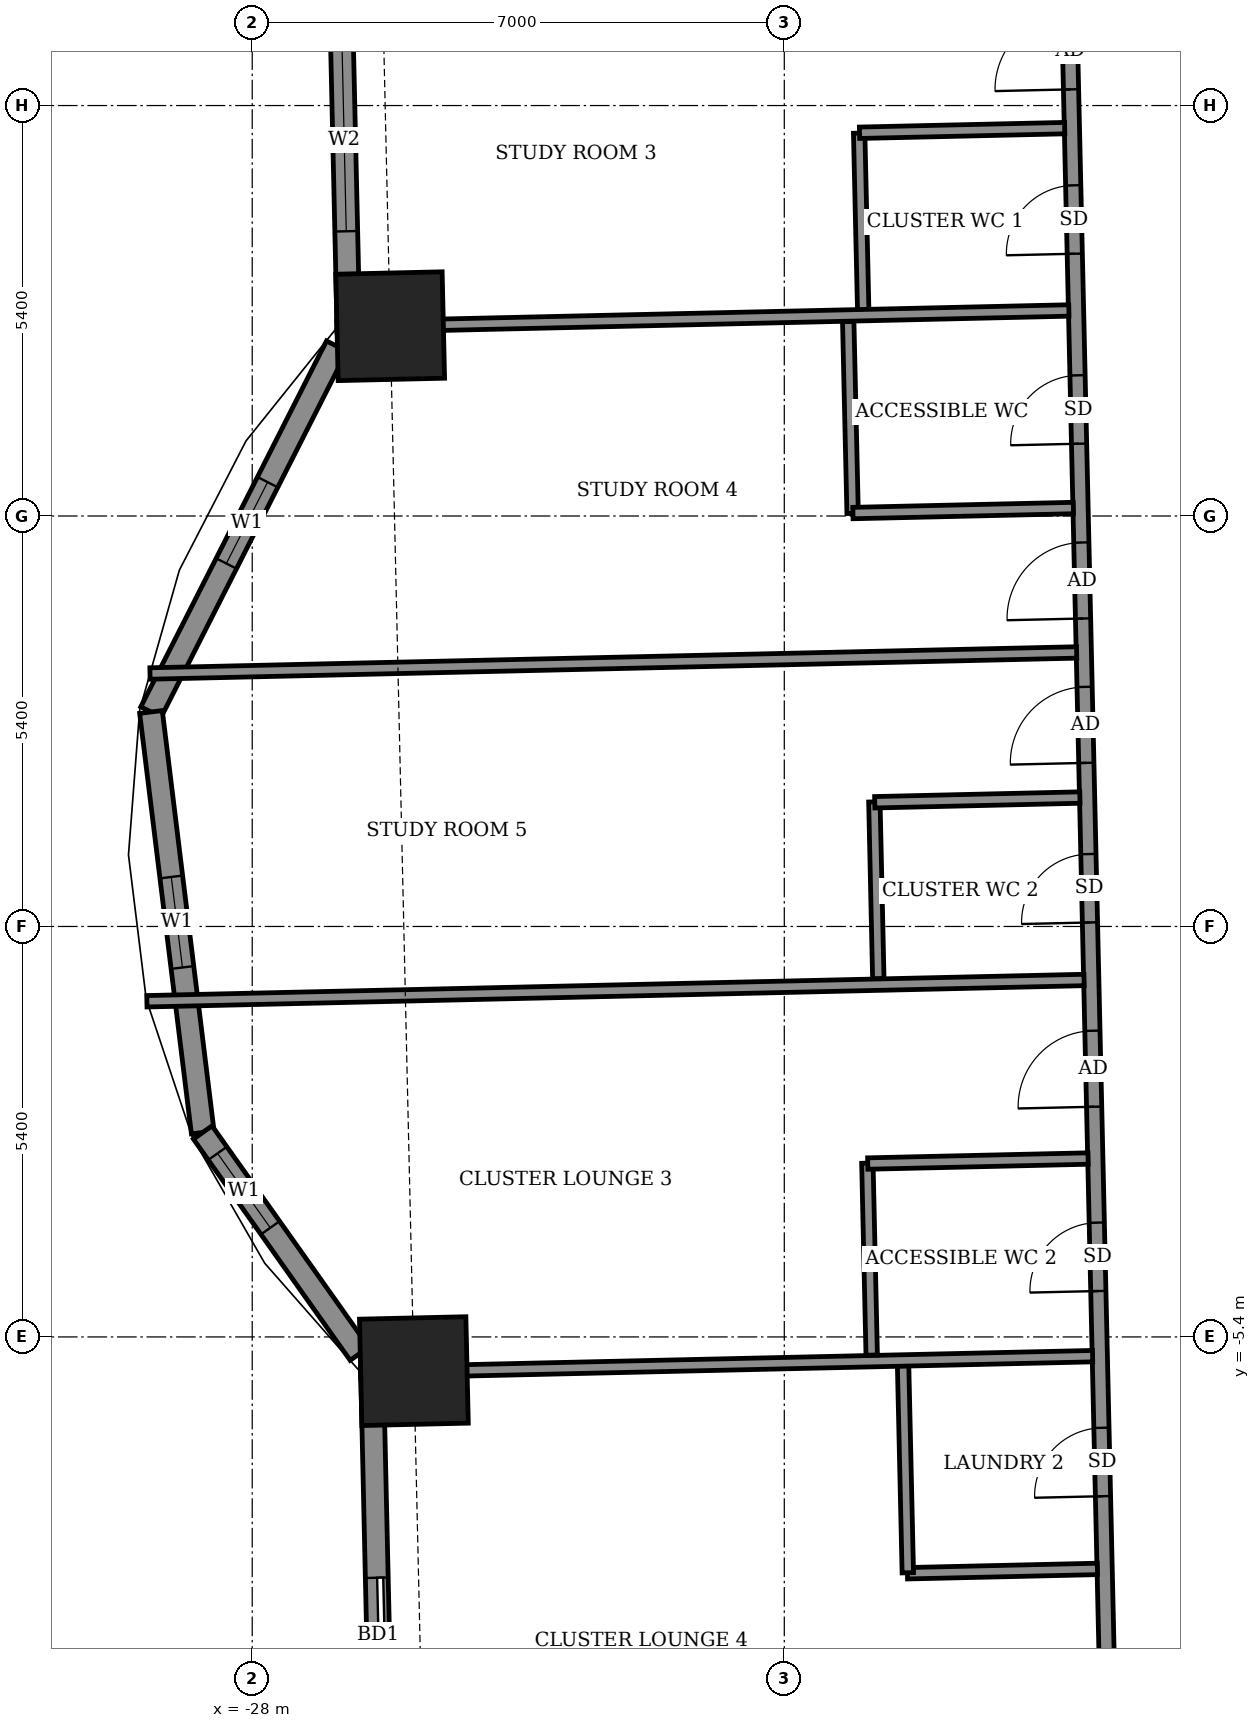
"""IFC4 building model, lengths in metres.
Left out: names, types, materials, properties, quantities, classifications, styles, units other than length and angle.
Written with IfcOpenShell. Run it as: python <this file> out.ifc"""

import sys

from ifc_helpers import new_model, si_unit, direction, frame, frame_2d, origin, origin_2d, place, context, subcontext, project, spatial, rectangle, extrude, element, fill, save


model = new_model("IFC4")
c1 = context("Model", 3, precision=1e-05, world=origin(), true_north=direction((0.0, 1.0)))
c2 = subcontext(c1, "Body", "Model", "MODEL_VIEW")
j1 = project(units=[si_unit("LENGTHUNIT", "METRE"), si_unit("PLANEANGLEUNIT", "RADIAN")], contexts=[c1])
p1 = place(None, origin())
s1 = spatial("IfcSite", under=j1, at=p1, CompositionType="ELEMENT")
p2 = place(p1, origin())
s2 = spatial("IfcBuilding", under=s1, at=p2, CompositionType="ELEMENT")
p3 = place(p2, frame((0.0, 0.0, 93.7)))
s3 = spatial("IfcBuildingStorey", under=s2, at=p3, CompositionType="ELEMENT", Elevation=93.7)
for number, where, z_axis, x_axis in (
    (1, (-25.873, -5.85, -0.55), (0.0, 0.0, 1.0), (0.023, -1.0, 0.0)),
    (2, (-26.185, 7.897, -0.55), (0.0, 0.0, 1.0), (0.023, -1.0, 0.0)),
):
    element("IfcColumn", number, at=place(p3, frame(where, z_axis=z_axis, x_axis=x_axis)), inside=s3, PredefinedType="COLUMN", context=c2, shape_type="SweptSolid", body=[
        extrude(rectangle(XDim=1.4, YDim=1.4, at=origin_2d()), origin(), (0.0, 0.0, 1.0), 3.6),
    ])
p4 = place(p3, frame((-27.036, 21.155, 0.0), z_axis=(0.0, 0.0, 1.0), x_axis=(0.022730142562, -0.999741636934, 0.0)))
e3 = element("IfcWall", 3, at=p4, inside=s3, PredefinedType="SOLIDWALL", context=c2, shape_type="SweptSolid", body=[
    extrude(rectangle(XDim=13.329, YDim=0.3, at=frame_2d((6.665, 0.0))), origin(), (0.0, 0.0, 1.0), 3.05),
])
p5 = place(p4, frame((2.805, 0.0, 0.0)))
e4 = element("IfcOpeningElement", 4, at=p5, cuts=e3, PredefinedType="OPENING", context=c2, shape_type="SweptSolid", body=[
    extrude(rectangle(XDim=1.5, YDim=2.4, at=frame_2d((0.75, 1.2))), frame((0.0, 0.16, 0.0), z_axis=(0.0, -1.0, 0.0), x_axis=(1.0, 0.0, 0.0)), (0.0, 0.0, 1.0), 0.32),
])
p6 = place(p4, frame((9.612, 0.0, 0.9)))
e5 = element("IfcOpeningElement", 5, at=p6, cuts=e3, PredefinedType="OPENING", context=c2, shape_type="SweptSolid", body=[
    extrude(rectangle(XDim=2.4, YDim=1.5, at=frame_2d((1.2, 0.75))), frame((0.0, 0.16, 0.0), z_axis=(0.0, -1.0, 0.0), x_axis=(1.0, 0.0, 0.0)), (0.0, 0.0, 1.0), 0.32),
])
p7 = place(p3, frame((-26.889, 7.635, 0.0), z_axis=(0.0, 0.0, 1.0), x_axis=(-0.452633159278, -0.891696822425, 0.0)))
e6 = element("IfcWall", 6, at=p7, inside=s3, PredefinedType="SOLIDWALL", context=c2, shape_type="SweptSolid", body=[
    extrude(rectangle(XDim=5.397, YDim=0.3, at=frame_2d((2.699, 0.0))), origin(), (0.0, 0.0, 1.0), 3.05),
])
p8 = place(p7, frame((2.007, 0.0, 0.9)))
e7 = element("IfcOpeningElement", 7, at=p8, cuts=e6, PredefinedType="OPENING", context=c2, shape_type="SweptSolid", body=[
    extrude(rectangle(XDim=1.2, YDim=1.5, at=frame_2d((0.6, 0.75))), frame((0.0, 0.16, 0.0), z_axis=(0.0, -1.0, 0.0), x_axis=(1.0, 0.0, 0.0)), (0.0, 0.0, 1.0), 0.32),
])
p9 = place(p3, frame((-29.332, 2.822, 0.0), z_axis=(0.0, 0.0, 1.0), x_axis=(0.122206978992, -0.992504636909, 0.0)))
e8 = element("IfcWall", 8, at=p9, inside=s3, PredefinedType="SOLIDWALL", context=c2, shape_type="SweptSolid", body=[
    extrude(rectangle(XDim=5.574, YDim=0.3, at=frame_2d((2.787, 0.0))), origin(), (0.0, 0.0, 1.0), 3.05),
])
p10 = place(p9, frame((2.187, 0.0, 0.9)))
e9 = element("IfcOpeningElement", 9, at=p10, cuts=e8, PredefinedType="OPENING", context=c2, shape_type="SweptSolid", body=[
    extrude(rectangle(XDim=1.2, YDim=1.5, at=frame_2d((0.6, 0.75))), frame((0.0, 0.16, 0.0), z_axis=(0.0, -1.0, 0.0), x_axis=(1.0, 0.0, 0.0)), (0.0, 0.0, 1.0), 0.32),
])
p11 = place(p3, frame((-28.651, -2.71, 0.0), z_axis=(0.0, 0.0, 1.0), x_axis=(0.577964171051, -0.816062140392, 0.0)))
e10 = element("IfcWall", 10, at=p11, inside=s3, PredefinedType="SOLIDWALL", context=c2, shape_type="SweptSolid", body=[
    extrude(rectangle(XDim=3.567, YDim=0.3, at=frame_2d((1.784, 0.0))), origin(), (0.0, 0.0, 1.0), 3.05),
])
p12 = place(p11, frame((0.337, 0.0, 0.9)))
e11 = element("IfcOpeningElement", 11, at=p12, cuts=e10, PredefinedType="OPENING", context=c2, shape_type="SweptSolid", body=[
    extrude(rectangle(XDim=1.2, YDim=1.5, at=frame_2d((0.6, 0.75))), frame((0.0, 0.16, 0.0), z_axis=(0.0, -1.0, 0.0), x_axis=(1.0, 0.0, 0.0)), (0.0, 0.0, 1.0), 0.32),
])
p13 = place(p3, frame((-26.424, -5.808, 0.0), z_axis=(0.0, 0.0, 1.0), x_axis=(0.022654755793, -0.999743348085, 0.0)))
e12 = element("IfcWall", 12, at=p13, inside=s3, PredefinedType="SOLIDWALL", context=c2, shape_type="SweptSolid", body=[
    extrude(rectangle(XDim=13.729, YDim=0.3, at=frame_2d((6.865, 0.0))), origin(), (0.0, 0.0, 1.0), 3.05),
])
p14 = place(p13, frame((2.761, 0.0, 0.0)))
e13 = element("IfcOpeningElement", 13, at=p14, cuts=e12, PredefinedType="OPENING", context=c2, shape_type="SweptSolid", body=[
    extrude(rectangle(XDim=1.5, YDim=2.4, at=frame_2d((0.75, 1.2))), frame((0.0, 0.16, 0.0), z_axis=(0.0, -1.0, 0.0), x_axis=(1.0, 0.0, 0.0)), (0.0, 0.0, 1.0), 0.32),
])
p15 = place(p13, frame((8.894, 0.0, 0.9)))
e14 = element("IfcOpeningElement", 14, at=p15, cuts=e12, PredefinedType="OPENING", context=c2, shape_type="SweptSolid", body=[
    extrude(rectangle(XDim=2.4, YDim=1.5, at=frame_2d((1.2, 0.75))), frame((0.0, 0.16, 0.0), z_axis=(0.0, -1.0, 0.0), x_axis=(1.0, 0.0, 0.0)), (0.0, 0.0, 1.0), 0.32),
])
p16 = place(p3, frame((-16.684, -12.919, 0.0), z_axis=(0.0, 0.0, 1.0), x_axis=(-0.022706151961, 0.999742182097, 0.0)))
e15 = element("IfcWall", 15, at=p16, inside=s3, PredefinedType="PARTITIONING", context=c2, shape_type="SweptSolid", body=[
    extrude(rectangle(XDim=25.45, YDim=0.2, at=frame_2d((12.725, 0.0))), origin(), (0.0, 0.0, 1.0), 3.05),
])
p17 = place(p16, frame((23.938, 0.0, 0.0)))
e16 = element("IfcOpeningElement", 16, at=p17, cuts=e15, PredefinedType="OPENING", context=c2, shape_type="SweptSolid", body=[
    extrude(rectangle(XDim=1.0, YDim=2.1, at=frame_2d((0.5, 1.05))), frame((0.0, 0.11, 0.0), z_axis=(0.0, -1.0, 0.0), x_axis=(1.0, 0.0, 0.0)), (0.0, 0.0, 1.0), 0.22),
])
p18 = place(p16, frame((21.775, 0.0, 0.0)))
e17 = element("IfcOpeningElement", 17, at=p18, cuts=e15, PredefinedType="OPENING", context=c2, shape_type="SweptSolid", body=[
    extrude(rectangle(XDim=0.9, YDim=2.1, at=frame_2d((0.45, 1.05))), frame((0.0, 0.11, 0.0), z_axis=(0.0, -1.0, 0.0), x_axis=(1.0, 0.0, 0.0)), (0.0, 0.0, 1.0), 0.22),
])
p19 = place(p16, frame((16.975, 0.0, 0.0)))
e18 = element("IfcOpeningElement", 18, at=p19, cuts=e15, PredefinedType="OPENING", context=c2, shape_type="SweptSolid", body=[
    extrude(rectangle(XDim=1.0, YDim=2.1, at=frame_2d((0.5, 1.05))), frame((0.0, 0.11, 0.0), z_axis=(0.0, -1.0, 0.0), x_axis=(1.0, 0.0, 0.0)), (0.0, 0.0, 1.0), 0.22),
])
p20 = place(p16, frame((19.275, 0.0, 0.0)))
e19 = element("IfcOpeningElement", 19, at=p20, cuts=e15, PredefinedType="OPENING", context=c2, shape_type="SweptSolid", body=[
    extrude(rectangle(XDim=0.9, YDim=2.1, at=frame_2d((0.45, 1.05))), frame((0.0, 0.11, 0.0), z_axis=(0.0, -1.0, 0.0), x_axis=(1.0, 0.0, 0.0)), (0.0, 0.0, 1.0), 0.22),
])
p21 = place(p16, frame((15.075, 0.0, 0.0)))
e20 = element("IfcOpeningElement", 20, at=p21, cuts=e15, PredefinedType="OPENING", context=c2, shape_type="SweptSolid", body=[
    extrude(rectangle(XDim=1.0, YDim=2.1, at=frame_2d((0.5, 1.05))), frame((0.0, 0.11, 0.0), z_axis=(0.0, -1.0, 0.0), x_axis=(1.0, 0.0, 0.0)), (0.0, 0.0, 1.0), 0.22),
])
p22 = place(p16, frame((12.975, 0.0, 0.0)))
e21 = element("IfcOpeningElement", 21, at=p22, cuts=e15, PredefinedType="OPENING", context=c2, shape_type="SweptSolid", body=[
    extrude(rectangle(XDim=0.9, YDim=2.1, at=frame_2d((0.45, 1.05))), frame((0.0, 0.11, 0.0), z_axis=(0.0, -1.0, 0.0), x_axis=(1.0, 0.0, 0.0)), (0.0, 0.0, 1.0), 0.22),
])
p23 = place(p16, frame((10.55, 0.0, 0.0)))
e22 = element("IfcOpeningElement", 22, at=p23, cuts=e15, PredefinedType="OPENING", context=c2, shape_type="SweptSolid", body=[
    extrude(rectangle(XDim=1.0, YDim=2.1, at=frame_2d((0.5, 1.05))), frame((0.0, 0.11, 0.0), z_axis=(0.0, -1.0, 0.0), x_axis=(1.0, 0.0, 0.0)), (0.0, 0.0, 1.0), 0.22),
])
p24 = place(p16, frame((8.125, 0.0, 0.0)))
e23 = element("IfcOpeningElement", 23, at=p24, cuts=e15, PredefinedType="OPENING", context=c2, shape_type="SweptSolid", body=[
    extrude(rectangle(XDim=0.9, YDim=2.1, at=frame_2d((0.45, 1.05))), frame((0.0, 0.11, 0.0), z_axis=(0.0, -1.0, 0.0), x_axis=(1.0, 0.0, 0.0)), (0.0, 0.0, 1.0), 0.22),
])
p25 = place(p16, frame((1.737, 0.0, 0.0)))
e24 = element("IfcOpeningElement", 24, at=p25, cuts=e15, PredefinedType="OPENING", context=c2, shape_type="SweptSolid", body=[
    extrude(rectangle(XDim=1.0, YDim=2.1, at=frame_2d((0.5, 1.05))), frame((0.0, 0.11, 0.0), z_axis=(0.0, -1.0, 0.0), x_axis=(1.0, 0.0, 0.0)), (0.0, 0.0, 1.0), 0.22),
])
p26 = place(p16, frame((5.425, 0.0, 0.0)))
e25 = element("IfcOpeningElement", 25, at=p26, cuts=e15, PredefinedType="OPENING", context=c2, shape_type="SweptSolid", body=[
    extrude(rectangle(XDim=0.9, YDim=2.1, at=frame_2d((0.45, 1.05))), frame((0.0, 0.11, 0.0), z_axis=(0.0, -1.0, 0.0), x_axis=(1.0, 0.0, 0.0)), (0.0, 0.0, 1.0), 0.22),
])
p27 = place(p3, frame((-19.38, -8.509, 0.0), z_axis=(0.0, 0.0, 1.0), x_axis=(0.999738750294, 0.02285675306, 0.0)))
e26 = element("IfcWall", 26, at=p27, inside=s3, PredefinedType="PARTITIONING", context=c2, shape_type="SweptSolid", body=[
    extrude(rectangle(XDim=2.5, YDim=0.15, at=frame_2d((1.25, 0.0))), origin(), (0.0, 0.0, 1.0), 3.05),
])
p28 = place(p3, frame((-19.375, -8.503, 0.0), z_axis=(0.0, 0.0, 1.0), x_axis=(-0.022760079124, 0.999740955847, 0.0)))
e27 = element("IfcWall", 27, at=p28, inside=s3, PredefinedType="PARTITIONING", context=c2, shape_type="SweptSolid", body=[
    extrude(rectangle(XDim=2.725, YDim=0.15, at=frame_2d((1.362, 0.0))), origin(), (0.0, 0.0, 1.0), 3.05),
])
p29 = place(p3, frame((-26.573, -5.871, 0.0), z_axis=(0.0, 0.0, 1.0), x_axis=(0.999743768709, 0.022636186244, 0.0)))
e28 = element("IfcWall", 28, at=p29, inside=s3, PredefinedType="PARTITIONING", context=c2, shape_type="SweptSolid", body=[
    extrude(rectangle(XDim=9.631, YDim=0.15, at=frame_2d((4.816, 0.0))), origin(), (0.0, 0.0, 1.0), 3.05),
])
p30 = place(p3, frame((-19.85, -5.639, 0.0), z_axis=(0.0, 0.0, 1.0), x_axis=(-0.022523775833, 0.999746307581, 0.0)))
e29 = element("IfcWall", 29, at=p30, inside=s3, PredefinedType="PARTITIONING", context=c2, shape_type="SweptSolid", body=[
    extrude(rectangle(XDim=2.526, YDim=0.15, at=frame_2d((1.263, 0.0))), origin(), (0.0, 0.0, 1.0), 3.05),
])
p31 = place(p3, frame((-19.902, -3.119, 0.0), z_axis=(0.0, 0.0, 1.0), x_axis=(0.999741618182, 0.022730967319, 0.0)))
e30 = element("IfcWall", 30, at=p31, inside=s3, PredefinedType="PARTITIONING", context=c2, shape_type="SweptSolid", body=[
    extrude(rectangle(XDim=2.9, YDim=0.15, at=frame_2d((1.45, 0.0))), origin(), (0.0, 0.0, 1.0), 3.05),
])
p32 = place(p3, frame((-29.386, -0.984, 0.0), z_axis=(0.0, 0.0, 1.0), x_axis=(0.999742652464, 0.022685432436, 0.0)))
e31 = element("IfcWall", 31, at=p32, inside=s3, PredefinedType="PARTITIONING", context=c2, shape_type="SweptSolid", body=[
    extrude(rectangle(XDim=12.333, YDim=0.15, at=frame_2d((6.167, 0.0))), origin(), (0.0, 0.0, 1.0), 2.1),
])
p33 = place(p3, frame((-19.763, -0.685, 0.0), z_axis=(0.0, 0.0, 1.0), x_axis=(-0.022370700241, 0.999749744571, 0.0)))
e32 = element("IfcWall", 32, at=p33, inside=s3, PredefinedType="PARTITIONING", context=c2, shape_type="SweptSolid", body=[
    extrude(rectangle(XDim=2.324, YDim=0.15, at=frame_2d((1.162, 0.0))), origin(), (0.0, 0.0, 1.0), 3.05),
])
p34 = place(p3, frame((-19.81, 1.634, 0.0), z_axis=(0.0, 0.0, 1.0), x_axis=(0.999736155505, 0.022969966847, 0.0)))
e33 = element("IfcWall", 33, at=p34, inside=s3, PredefinedType="PARTITIONING", context=c2, shape_type="SweptSolid", body=[
    extrude(rectangle(XDim=2.7, YDim=0.15, at=frame_2d((1.35, 0.0))), origin(), (0.0, 0.0, 1.0), 3.05),
])
p35 = place(p3, frame((-29.345, 3.328, 0.0), z_axis=(0.0, 0.0, 1.0), x_axis=(0.999741773524, 0.022724134116, 0.0)))
e34 = element("IfcWall", 34, at=p35, inside=s3, PredefinedType="PARTITIONING", context=c2, shape_type="SweptSolid", body=[
    extrude(rectangle(XDim=12.194, YDim=0.15, at=frame_2d((6.097, 0.0))), origin(), (0.0, 0.0, 1.0), 2.1),
])
p36 = place(p3, frame((-20.101, 5.434, 0.0), z_axis=(0.0, 0.0, 1.0), x_axis=(-0.022919108675, 0.999737322729, 0.0)))
e35 = element("IfcWall", 35, at=p36, inside=s3, PredefinedType="PARTITIONING", context=c2, shape_type="SweptSolid", body=[
    extrude(rectangle(XDim=2.525, YDim=0.15, at=frame_2d((1.262, 0.0))), origin(), (0.0, 0.0, 1.0), 3.05),
])
p37 = place(p3, frame((-20.097, 5.439, 0.0), z_axis=(0.0, 0.0, 1.0), x_axis=(0.999741748633, 0.022725229174, 0.0)))
e36 = element("IfcWall", 36, at=p37, inside=s3, PredefinedType="PARTITIONING", context=c2, shape_type="SweptSolid", body=[
    extrude(rectangle(XDim=2.901, YDim=0.15, at=frame_2d((1.45, 0.0))), origin(), (0.0, 0.0, 1.0), 3.05),
])
p38 = place(p3, frame((-19.962, 8.112, 0.0), z_axis=(0.0, 0.0, 1.0), x_axis=(-0.022781023197, 0.999740478815, 0.0)))
e37 = element("IfcWall", 37, at=p38, inside=s3, PredefinedType="PARTITIONING", context=c2, shape_type="SweptSolid", body=[
    extrude(rectangle(XDim=2.325, YDim=0.15, at=frame_2d((1.163, 0.0))), origin(), (0.0, 0.0, 1.0), 3.05),
])
p39 = place(p3, frame((-26.885, 7.885, 0.0), z_axis=(0.0, 0.0, 1.0), x_axis=(0.999741468995, 0.022737527832, 0.0)))
e38 = element("IfcWall", 38, at=p39, inside=s3, PredefinedType="PARTITIONING", context=c2, shape_type="SweptSolid", body=[
    extrude(rectangle(XDim=9.631, YDim=0.15, at=frame_2d((4.816, 0.0))), origin(), (0.0, 0.0, 1.0), 3.05),
])
p40 = place(p3, frame((-20.01, 10.442, 0.0), z_axis=(0.0, 0.0, 1.0), x_axis=(0.999744396973, 0.02260842146, 0.0)))
e39 = element("IfcWall", 39, at=p40, inside=s3, PredefinedType="PARTITIONING", context=c2, shape_type="SweptSolid", body=[
    extrude(rectangle(XDim=2.7, YDim=0.15, at=frame_2d((1.35, 0.0))), origin(), (0.0, 0.0, 1.0), 3.05),
])
p41 = place(p6, origin())
e40 = element("IfcWindow", 40, at=p41, inside=s3, PartitioningType="DOUBLE_PANEL_VERTICAL", PredefinedType="WINDOW", context=c2, shape_type="SweptSolid", body=[
    extrude(rectangle(XDim=2.4, YDim=1.5, at=frame_2d((1.2, 0.75))), frame((0.0, 0.03, 0.0), z_axis=(0.0, -1.0, 0.0), x_axis=(1.0, 0.0, 0.0)), (0.0, 0.0, 1.0), 0.06),
])
fill(e5, e40)
p42 = place(p8, origin())
e41 = element("IfcWindow", 41, at=p42, inside=s3, PartitioningType="SINGLE_PANEL", PredefinedType="WINDOW", context=c2, shape_type="SweptSolid", body=[
    extrude(rectangle(XDim=1.2, YDim=1.5, at=frame_2d((0.6, 0.75))), frame((0.0, 0.03, 0.0), z_axis=(0.0, -1.0, 0.0), x_axis=(1.0, 0.0, 0.0)), (0.0, 0.0, 1.0), 0.06),
])
fill(e7, e41)
p43 = place(p10, origin())
e42 = element("IfcWindow", 42, at=p43, inside=s3, PartitioningType="SINGLE_PANEL", PredefinedType="WINDOW", context=c2, shape_type="SweptSolid", body=[
    extrude(rectangle(XDim=1.2, YDim=1.5, at=frame_2d((0.6, 0.75))), frame((0.0, 0.03, 0.0), z_axis=(0.0, -1.0, 0.0), x_axis=(1.0, 0.0, 0.0)), (0.0, 0.0, 1.0), 0.06),
])
fill(e9, e42)
p44 = place(p12, origin())
e43 = element("IfcWindow", 43, at=p44, inside=s3, PartitioningType="SINGLE_PANEL", PredefinedType="WINDOW", context=c2, shape_type="SweptSolid", body=[
    extrude(rectangle(XDim=1.2, YDim=1.5, at=frame_2d((0.6, 0.75))), frame((0.0, 0.03, 0.0), z_axis=(0.0, -1.0, 0.0), x_axis=(1.0, 0.0, 0.0)), (0.0, 0.0, 1.0), 0.06),
])
fill(e11, e43)
p45 = place(p14, origin())
e44 = element("IfcDoor", 44, at=p45, inside=s3, OperationType="SLIDING_TO_LEFT", PredefinedType="DOOR", context=c2, shape_type="SweptSolid", body=[
    extrude(rectangle(XDim=1.5, YDim=2.4, at=frame_2d((0.75, 1.2))), frame((0.0, 0.025, 0.0), z_axis=(0.0, -1.0, 0.0), x_axis=(1.0, 0.0, 0.0)), (0.0, 0.0, 1.0), 0.05),
])
fill(e13, e44)
p46 = place(p17, origin())
e45 = element("IfcDoor", 45, at=p46, inside=s3, OperationType="SINGLE_SWING_LEFT", PredefinedType="DOOR", context=c2, shape_type="SweptSolid", body=[
    extrude(rectangle(XDim=1.0, YDim=2.1, at=frame_2d((0.5, 1.05))), frame((0.0, 0.025, 0.0), z_axis=(0.0, -1.0, 0.0), x_axis=(1.0, 0.0, 0.0)), (0.0, 0.0, 1.0), 0.05),
])
fill(e16, e45)
p47 = place(p18, origin())
e46 = element("IfcDoor", 46, at=p47, inside=s3, OperationType="SINGLE_SWING_LEFT", PredefinedType="DOOR", context=c2, shape_type="SweptSolid", body=[
    extrude(rectangle(XDim=0.9, YDim=2.1, at=frame_2d((0.45, 1.05))), frame((0.0, 0.025, 0.0), z_axis=(0.0, -1.0, 0.0), x_axis=(1.0, 0.0, 0.0)), (0.0, 0.0, 1.0), 0.05),
])
fill(e17, e46)
p48 = place(p19, origin())
e47 = element("IfcDoor", 47, at=p48, inside=s3, OperationType="SINGLE_SWING_RIGHT", PredefinedType="DOOR", context=c2, shape_type="SweptSolid", body=[
    extrude(rectangle(XDim=1.0, YDim=2.1, at=frame_2d((0.5, 1.05))), frame((0.0, 0.025, 0.0), z_axis=(0.0, -1.0, 0.0), x_axis=(1.0, 0.0, 0.0)), (0.0, 0.0, 1.0), 0.05),
])
fill(e18, e47)
p49 = place(p20, origin())
e48 = element("IfcDoor", 48, at=p49, inside=s3, OperationType="SINGLE_SWING_RIGHT", PredefinedType="DOOR", context=c2, shape_type="SweptSolid", body=[
    extrude(rectangle(XDim=0.9, YDim=2.1, at=frame_2d((0.45, 1.05))), frame((0.0, 0.025, 0.0), z_axis=(0.0, -1.0, 0.0), x_axis=(1.0, 0.0, 0.0)), (0.0, 0.0, 1.0), 0.05),
])
fill(e19, e48)
p50 = place(p21, origin())
e49 = element("IfcDoor", 49, at=p50, inside=s3, OperationType="SINGLE_SWING_LEFT", PredefinedType="DOOR", context=c2, shape_type="SweptSolid", body=[
    extrude(rectangle(XDim=1.0, YDim=2.1, at=frame_2d((0.5, 1.05))), frame((0.0, 0.025, 0.0), z_axis=(0.0, -1.0, 0.0), x_axis=(1.0, 0.0, 0.0)), (0.0, 0.0, 1.0), 0.05),
])
fill(e20, e49)
p51 = place(p22, origin())
e50 = element("IfcDoor", 50, at=p51, inside=s3, OperationType="SINGLE_SWING_LEFT", PredefinedType="DOOR", context=c2, shape_type="SweptSolid", body=[
    extrude(rectangle(XDim=0.9, YDim=2.1, at=frame_2d((0.45, 1.05))), frame((0.0, 0.025, 0.0), z_axis=(0.0, -1.0, 0.0), x_axis=(1.0, 0.0, 0.0)), (0.0, 0.0, 1.0), 0.05),
])
fill(e21, e50)
p52 = place(p23, origin())
e51 = element("IfcDoor", 51, at=p52, inside=s3, OperationType="SINGLE_SWING_RIGHT", PredefinedType="DOOR", context=c2, shape_type="SweptSolid", body=[
    extrude(rectangle(XDim=1.0, YDim=2.1, at=frame_2d((0.5, 1.05))), frame((0.0, 0.025, 0.0), z_axis=(0.0, -1.0, 0.0), x_axis=(1.0, 0.0, 0.0)), (0.0, 0.0, 1.0), 0.05),
])
fill(e22, e51)
p53 = place(p24, origin())
e52 = element("IfcDoor", 52, at=p53, inside=s3, OperationType="SINGLE_SWING_RIGHT", PredefinedType="DOOR", context=c2, shape_type="SweptSolid", body=[
    extrude(rectangle(XDim=0.9, YDim=2.1, at=frame_2d((0.45, 1.05))), frame((0.0, 0.025, 0.0), z_axis=(0.0, -1.0, 0.0), x_axis=(1.0, 0.0, 0.0)), (0.0, 0.0, 1.0), 0.05),
])
fill(e23, e52)
p54 = place(p26, origin())
e53 = element("IfcDoor", 53, at=p54, inside=s3, OperationType="SINGLE_SWING_LEFT", PredefinedType="DOOR", context=c2, shape_type="SweptSolid", body=[
    extrude(rectangle(XDim=0.9, YDim=2.1, at=frame_2d((0.45, 1.05))), frame((0.0, 0.025, 0.0), z_axis=(0.0, -1.0, 0.0), x_axis=(1.0, 0.0, 0.0)), (0.0, 0.0, 1.0), 0.05),
])
fill(e25, e53)
save(model, sys.argv[1])
